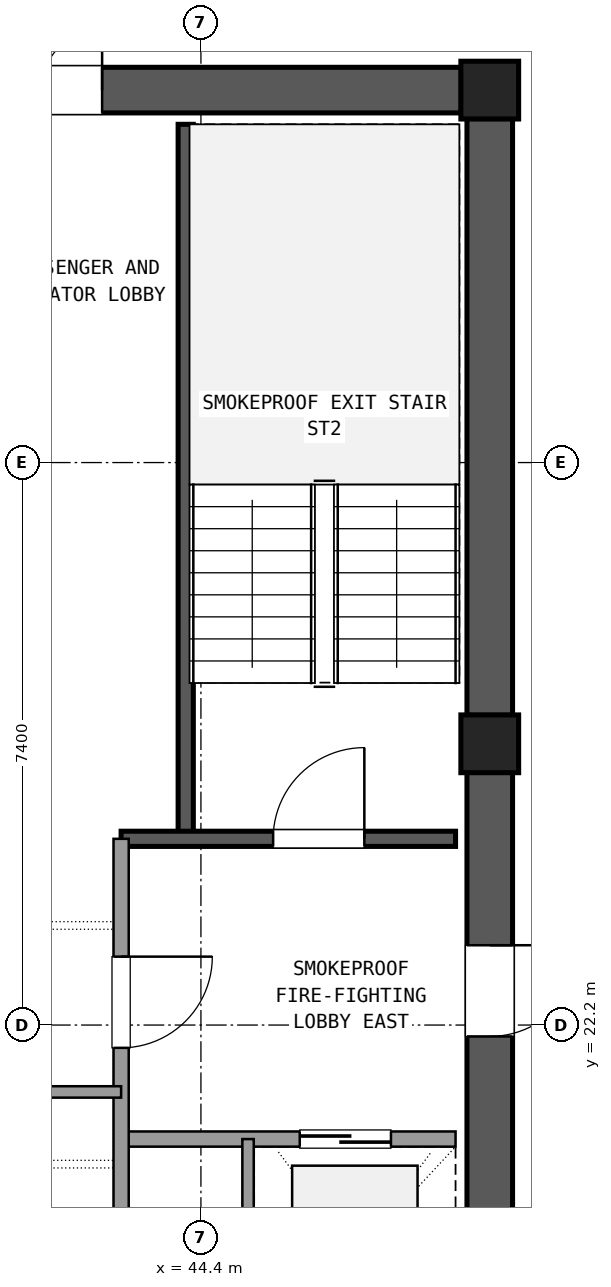
"""IFC4 building model, lengths in metres.
Left out: names, types, materials, properties, quantities, classifications, styles, units other than length and angle.
Written with IfcOpenShell. Run it as: python <this file> out.ifc"""

import sys

from ifc_helpers import new_model, si_unit, direction, frame, frame_2d, origin, origin_2d, place, context, subcontext, project, spatial, rectangle, extrude, element, fill, save


model = new_model("IFC4")
c1 = context("Model", 3, precision=1e-05, world=origin(), true_north=direction((0.0, 1.0)))
c2 = subcontext(c1, "Body", "Model", "MODEL_VIEW")
j1 = project(units=[si_unit("LENGTHUNIT", "METRE"), si_unit("PLANEANGLEUNIT", "RADIAN")], contexts=[c1])
p1 = place(None, origin())
s1 = spatial("IfcSite", under=j1, at=p1, CompositionType="ELEMENT")
p2 = place(p1, origin())
s2 = spatial("IfcBuilding", under=s1, at=p2, CompositionType="ELEMENT")
p3 = place(p2, frame((0.0, 0.0, 264.42)))
s3 = spatial("IfcBuildingStorey", under=s2, at=p3, CompositionType="ELEMENT", Elevation=264.42)
for number, where, z_axis, x_axis in (
    (1, (48.2, 25.9, 0.0), (0.0, 0.0, 1.0), (1.0, 0.0, 0.0)),
    (2, (48.2, 34.5, 0.0), (0.0, 0.0, 1.0), (1.0, 0.0, 0.0)),
):
    element("IfcColumn", number, at=place(p3, frame(where, z_axis=z_axis, x_axis=x_axis)), inside=s3, PredefinedType="COLUMN", context=c2, shape_type="SweptSolid", body=[
        extrude(rectangle(XDim=0.76, YDim=0.76, at=origin_2d()), origin(), (0.0, 0.0, 1.0), 3.6),
    ])
p4 = place(p3, frame((48.2, 17.675, 0.0), z_axis=(0.0, 0.0, 1.0), x_axis=(0.0, 1.0, 0.0)))
e3 = element("IfcWall", 3, at=p4, inside=s3, PredefinedType="SHEAR", context=c2, shape_type="SweptSolid", body=[
    extrude(rectangle(XDim=7.85, YDim=0.6, at=frame_2d((3.925, 0.0))), origin(), (0.0, 0.0, 1.0), 3.32),
])
p5 = place(p4, frame((4.375, 0.0, 0.0)))
e4 = element("IfcOpeningElement", 4, at=p5, cuts=e3, PredefinedType="OPENING", context=c2, shape_type="SweptSolid", body=[
    extrude(rectangle(XDim=1.2, YDim=2.15, at=frame_2d((0.6, 1.075))), frame((0.0, 0.31, 0.0), z_axis=(0.0, -1.0, 0.0), x_axis=(1.0, 0.0, 0.0)), (0.0, 0.0, 1.0), 0.62),
])
p6 = place(p3, frame((48.2, 26.275, 0.0), z_axis=(0.0, 0.0, 1.0), x_axis=(0.0, 1.0, 0.0)))
e5 = element("IfcWall", 5, at=p6, inside=s3, PredefinedType="SHEAR", context=c2, shape_type="SweptSolid", body=[
    extrude(rectangle(XDim=7.85, YDim=0.6, at=frame_2d((3.925, 0.0))), origin(), (0.0, 0.0, 1.0), 3.32),
])
p7 = place(p3, frame((47.825, 34.5, 0.0), z_axis=(0.0, 0.0, 1.0), x_axis=(-1.0, 0.0, 0.0)))
e6 = element("IfcWall", 6, at=p7, inside=s3, PredefinedType="SHEAR", context=c2, shape_type="SweptSolid", body=[
    extrude(rectangle(XDim=10.45, YDim=0.6, at=frame_2d((5.225, 0.0))), origin(), (0.0, 0.0, 1.0), 3.32),
])
p8 = place(p7, frame((4.725, 0.0, 0.0)))
e7 = element("IfcOpeningElement", 7, at=p8, cuts=e6, PredefinedType="OPENING", context=c2, shape_type="SweptSolid", body=[
    extrude(rectangle(XDim=1.6, YDim=2.2, at=frame_2d((0.8, 1.1))), frame((0.0, 0.31, 0.0), z_axis=(0.0, -1.0, 0.0), x_axis=(1.0, 0.0, 0.0)), (0.0, 0.0, 1.0), 0.62),
])
p9 = place(p3, frame((44.2, 24.65, 0.0), z_axis=(0.0, 0.0, 1.0), x_axis=(0.0, 1.0, 0.0)))
e8 = element("IfcWall", 8, at=p9, inside=s3, PredefinedType="SHEAR", context=c2, shape_type="SweptSolid", body=[
    extrude(rectangle(XDim=9.4, YDim=0.2, at=frame_2d((4.7, 0.0))), origin(), (0.0, 0.0, 1.0), 3.32),
])
p10 = place(p3, frame((43.35, 24.65, 0.0), z_axis=(0.0, 0.0, 1.0), x_axis=(1.0, 0.0, 0.0)))
e9 = element("IfcWall", 9, at=p10, inside=s3, PredefinedType="SHEAR", context=c2, shape_type="SweptSolid", body=[
    extrude(rectangle(XDim=4.4, YDim=0.2, at=frame_2d((2.2, 0.0))), origin(), (0.0, 0.0, 1.0), 3.32),
])
p11 = place(p10, frame((2.0, 0.0, 0.0)))
e10 = element("IfcOpeningElement", 10, at=p11, cuts=e9, PredefinedType="OPENING", context=c2, shape_type="SweptSolid", body=[
    extrude(rectangle(XDim=1.2, YDim=2.15, at=frame_2d((0.6, 1.075))), frame((0.0, 0.11, 0.0), z_axis=(0.0, -1.0, 0.0), x_axis=(1.0, 0.0, 0.0)), (0.0, 0.0, 1.0), 0.22),
])
p12 = place(p3, frame((43.35, 20.7, 0.0), z_axis=(0.0, 0.0, 1.0), x_axis=(1.0, 0.0, 0.0)))
e11 = element("IfcWall", 11, at=p12, inside=s3, PredefinedType="SOLIDWALL", context=c2, shape_type="SweptSolid", body=[
    extrude(rectangle(XDim=4.4, YDim=0.2, at=frame_2d((2.2, 0.0))), origin(), (0.0, 0.0, 1.0), 2.61),
])
p13 = place(p12, frame((2.35, 0.0, 0.0)))
e12 = element("IfcOpeningElement", 12, at=p13, cuts=e11, PredefinedType="OPENING", context=c2, shape_type="SweptSolid", body=[
    extrude(rectangle(XDim=1.2, YDim=2.15, at=frame_2d((0.6, 1.075))), frame((0.0, 0.11, 0.0), z_axis=(0.0, -1.0, 0.0), x_axis=(1.0, 0.0, 0.0)), (0.0, 0.0, 1.0), 0.22),
])
p14 = place(p3, frame((43.35, 17.75, 0.0), z_axis=(0.0, 0.0, 1.0), x_axis=(0.0, 1.0, 0.0)))
e13 = element("IfcWall", 13, at=p14, inside=s3, PredefinedType="SOLIDWALL", context=c2, shape_type="SweptSolid", body=[
    extrude(rectangle(XDim=6.9, YDim=0.2, at=frame_2d((3.45, 0.0))), origin(), (0.0, 0.0, 1.0), 2.61),
])
p15 = place(p14, frame((4.15, 0.0, 0.0)))
e14 = element("IfcOpeningElement", 14, at=p15, cuts=e13, PredefinedType="OPENING", context=c2, shape_type="SweptSolid", body=[
    extrude(rectangle(XDim=1.2, YDim=2.15, at=frame_2d((0.6, 1.075))), frame((0.0, 0.11, 0.0), z_axis=(0.0, -1.0, 0.0), x_axis=(1.0, 0.0, 0.0)), (0.0, 0.0, 1.0), 0.22),
])
p16 = place(p3, frame((45.02, 17.75, 0.0), z_axis=(0.0, 0.0, 1.0), x_axis=(0.0, 1.0, 0.0)))
e15 = element("IfcWall", 15, at=p16, inside=s3, PredefinedType="PARTITIONING", context=c2, shape_type="SweptSolid", body=[
    extrude(rectangle(XDim=2.95, YDim=0.15, at=frame_2d((1.475, 0.0))), origin(), (0.0, 0.0, 1.0), 2.61),
])
p17 = place(p3, frame((37.25, 21.32, 0.0), z_axis=(0.0, 0.0, 1.0), x_axis=(1.0, 0.0, 0.0)))
e16 = element("IfcWall", 16, at=p17, inside=s3, PredefinedType="PARTITIONING", context=c2, shape_type="SweptSolid", body=[
    extrude(rectangle(XDim=6.1, YDim=0.15, at=frame_2d((3.05, 0.0))), origin(), (0.0, 0.0, 1.0), 2.61),
])
p18 = place(p17, frame((0.55, 0.0, 0.0)))
e17 = element("IfcOpeningElement", 17, at=p18, cuts=e16, PredefinedType="OPENING", context=c2, shape_type="SweptSolid", body=[
    extrude(rectangle(XDim=1.0, YDim=2.15, at=frame_2d((0.5, 1.075))), frame((0.0, 0.085, 0.0), z_axis=(0.0, -1.0, 0.0), x_axis=(1.0, 0.0, 0.0)), (0.0, 0.0, 1.0), 0.17),
])
p19 = place(p17, frame((3.5, 0.0, 0.0)))
e18 = element("IfcOpeningElement", 18, at=p19, cuts=e16, PredefinedType="OPENING", context=c2, shape_type="SweptSolid", body=[
    extrude(rectangle(XDim=1.0, YDim=2.15, at=frame_2d((0.5, 1.075))), frame((0.0, 0.085, 0.0), z_axis=(0.0, -1.0, 0.0), x_axis=(1.0, 0.0, 0.0)), (0.0, 0.0, 1.0), 0.17),
])
p20 = place(p11, origin())
e19 = element("IfcDoor", 19, at=p20, inside=s3, OperationType="SINGLE_SWING_RIGHT", PredefinedType="DOOR", context=c2, shape_type="SweptSolid", body=[
    extrude(rectangle(XDim=1.2, YDim=2.15, at=frame_2d((0.6, 1.075))), frame((0.0, 0.025, 0.0), z_axis=(0.0, -1.0, 0.0), x_axis=(1.0, 0.0, 0.0)), (0.0, 0.0, 1.0), 0.05),
])
fill(e10, e19)
p21 = place(p13, origin())
e20 = element("IfcDoor", 20, at=p21, inside=s3, OperationType="SLIDING_TO_RIGHT", PredefinedType="DOOR", context=c2, shape_type="SweptSolid", body=[
    extrude(rectangle(XDim=1.2, YDim=2.15, at=frame_2d((0.6, 1.075))), frame((0.0, 0.025, 0.0), z_axis=(0.0, -1.0, 0.0), x_axis=(1.0, 0.0, 0.0)), (0.0, 0.0, 1.0), 0.05),
])
fill(e12, e20)
p22 = place(p15, frame((1.2, 0.0, 0.0), z_axis=(0.0, 0.0, 1.0), x_axis=(-1.0, 0.0, 0.0)))
e21 = element("IfcDoor", 21, at=p22, inside=s3, OperationType="SINGLE_SWING_RIGHT", PredefinedType="DOOR", context=c2, shape_type="SweptSolid", body=[
    extrude(rectangle(XDim=1.2, YDim=2.15, at=frame_2d((0.6, 1.075))), frame((0.0, 0.025, 0.0), z_axis=(0.0, -1.0, 0.0), x_axis=(1.0, 0.0, 0.0)), (0.0, 0.0, 1.0), 0.05),
])
fill(e14, e21)
p23 = place(p5, frame((1.2, 0.0, 0.0), z_axis=(0.0, 0.0, 1.0), x_axis=(-1.0, 0.0, 0.0)))
e22 = element("IfcDoor", 22, at=p23, inside=s3, OperationType="SINGLE_SWING_RIGHT", PredefinedType="DOOR", context=c2, shape_type="SweptSolid", body=[
    extrude(rectangle(XDim=1.2, YDim=2.15, at=frame_2d((0.6, 1.075))), frame((0.0, 0.025, 0.0), z_axis=(0.0, -1.0, 0.0), x_axis=(1.0, 0.0, 0.0)), (0.0, 0.0, 1.0), 0.05),
])
fill(e4, e22)
p24 = place(p8, frame((1.6, 0.0, 0.0), z_axis=(0.0, 0.0, 1.0), x_axis=(-1.0, 0.0, 0.0)))
e23 = element("IfcDoor", 23, at=p24, inside=s3, OperationType="DOUBLE_DOOR_SINGLE_SWING", PredefinedType="DOOR", context=c2, shape_type="SweptSolid", body=[
    extrude(rectangle(XDim=1.6, YDim=2.2, at=frame_2d((0.8, 1.1))), frame((0.0, 0.025, 0.0), z_axis=(0.0, -1.0, 0.0), x_axis=(1.0, 0.0, 0.0)), (0.0, 0.0, 1.0), 0.05),
])
fill(e7, e23)
save(model, sys.argv[1])
